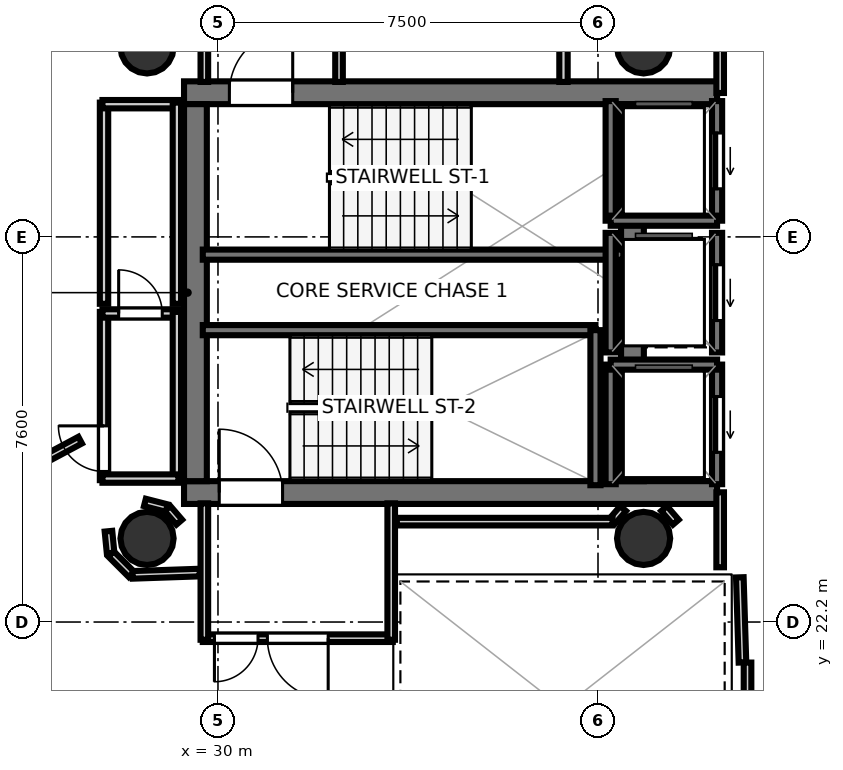
"""IFC4 building model, lengths in metres.
Left out: names, types, materials, properties, quantities, classifications, styles, units other than length and angle.
Written with IfcOpenShell. Run it as: python <this file> out.ifc"""

import sys

from ifc_helpers import new_model, si_unit, direction, frame, frame_2d, origin, origin_2d, place, context, subcontext, project, spatial, rectangle, hollow_circle, extrude, element, fill, save


model = new_model("IFC4")
c1 = context("Model", 3, precision=1e-05, world=origin(), true_north=direction((0.0, 1.0)))
c2 = subcontext(c1, "Body", "Model", "MODEL_VIEW")
j1 = project(units=[si_unit("LENGTHUNIT", "METRE"), si_unit("PLANEANGLEUNIT", "RADIAN")], contexts=[c1])
p1 = place(None, origin())
s1 = spatial("IfcSite", under=j1, at=p1, CompositionType="ELEMENT")
p2 = place(p1, origin())
s2 = spatial("IfcBuilding", under=s1, at=p2, CompositionType="ELEMENT")
p3 = place(p2, frame((0.0, 0.0, 239.0)))
s3 = spatial("IfcBuildingStorey", under=s2, at=p3, CompositionType="ELEMENT", Elevation=239.0)
p4 = place(p3, frame((29.33, 32.645, 0.0), z_axis=(0.0, 0.0, 1.0), x_axis=(1.0, 0.0, 0.0)))
e1 = element("IfcWall", 1, at=p4, inside=s3, PredefinedType="SHEAR", context=c2, shape_type="SweptSolid", body=[
    extrude(rectangle(XDim=10.52, YDim=0.45, at=frame_2d((5.26, 0.0))), origin(), (0.0, 0.0, 1.0), 3.52),
])
p5 = place(p4, frame((0.895, 0.0, 0.0)))
e2 = element("IfcOpeningElement", 2, at=p5, cuts=e1, PredefinedType="OPENING", context=c2, shape_type="SweptSolid", body=[
    extrude(rectangle(XDim=1.25, YDim=2.15, at=frame_2d((0.625, 1.075))), frame((0.0, 0.235, 0.0), z_axis=(0.0, -1.0, 0.0), x_axis=(1.0, 0.0, 0.0)), (0.0, 0.0, 1.0), 0.47),
])
p6 = place(p3, frame((29.33, 24.755, 0.0), z_axis=(0.0, 0.0, 1.0), x_axis=(1.0, 0.0, 0.0)))
e3 = element("IfcWall", 3, at=p6, inside=s3, PredefinedType="SHEAR", context=c2, shape_type="SweptSolid", body=[
    extrude(rectangle(XDim=10.52, YDim=0.45, at=frame_2d((5.26, 0.0))), origin(), (0.0, 0.0, 1.0), 3.52),
])
p7 = place(p6, frame((0.695, 0.0, 0.0)))
e4 = element("IfcOpeningElement", 4, at=p7, cuts=e3, PredefinedType="OPENING", context=c2, shape_type="SweptSolid", body=[
    extrude(rectangle(XDim=1.25, YDim=2.15, at=frame_2d((0.625, 1.075))), frame((0.0, 0.235, 0.0), z_axis=(0.0, -1.0, 0.0), x_axis=(1.0, 0.0, 0.0)), (0.0, 0.0, 1.0), 0.47),
])
for number, where, z_axis, x_axis in (
    (5, (29.555, 24.98, 0.0), (0.0, 0.0, 1.0), (0.0, 1.0, 0.0)),
    (6, (38.18, 24.98, 0.0), (0.0, 0.0, 1.0), (0.0, 1.0, 0.0)),
):
    element("IfcWall", number, at=place(p3, frame(where, z_axis=z_axis, x_axis=x_axis)), inside=s3, PredefinedType="SHEAR", context=c2, shape_type="SweptSolid", body=[
        extrude(rectangle(XDim=7.44, YDim=0.45, at=frame_2d((3.72, 0.0))), origin(), (0.0, 0.0, 1.0), 3.52),
    ])
for number, where, z_axis, x_axis in (
    (7, (28.6, 33.55, 0.0), (0.0, 0.0, 1.0), (1.0, 0.0, 0.0)),
    (8, (28.6, 23.85, 0.0), (0.0, 0.0, 1.0), (1.0, 0.0, 0.0)),
    (9, (38.4, 33.55, 0.0), (0.0, 0.0, 1.0), (1.0, 0.0, 0.0)),
    (10, (38.4, 23.85, 0.0), (0.0, 0.0, 1.0), (1.0, 0.0, 0.0)),
):
    element("IfcColumn", number, at=place(p3, frame(where, z_axis=z_axis, x_axis=x_axis)), inside=s3, PredefinedType="COLUMN", context=c2, shape_type="SweptSolid", body=[
        extrude(hollow_circle(Radius=0.525, WallThickness=0.028, at=origin_2d()), origin(), (0.0, 0.0, 1.0), 3.7),
    ])
p8 = place(p3, frame((29.7, 29.45, 0.0), z_axis=(0.0, 0.0, 1.0), x_axis=(1.0, 0.0, 0.0)))
e11 = element("IfcWall", 11, at=p8, inside=s3, PredefinedType="SOLIDWALL", context=c2, shape_type="SweptSolid", body=[
    extrude(rectangle(XDim=8.3, YDim=0.2, at=frame_2d((4.15, 0.0))), origin(), (0.0, 0.0, 1.0), 3.52),
])
p9 = place(p3, frame((29.7, 27.96, 0.0), z_axis=(0.0, 0.0, 1.0), x_axis=(1.0, 0.0, 0.0)))
e12 = element("IfcWall", 12, at=p9, inside=s3, PredefinedType="SOLIDWALL", context=c2, shape_type="SweptSolid", body=[
    extrude(rectangle(XDim=7.75, YDim=0.2, at=frame_2d((3.875, 0.0))), origin(), (0.0, 0.0, 1.0), 3.52),
])
p10 = place(p3, frame((37.45, 24.9, 0.0), z_axis=(0.0, 0.0, 1.0), x_axis=(0.0, 1.0, 0.0)))
e13 = element("IfcWall", 13, at=p10, inside=s3, PredefinedType="SOLIDWALL", context=c2, shape_type="SweptSolid", body=[
    extrude(rectangle(XDim=3.06, YDim=0.2, at=frame_2d((1.53, 0.0))), origin(), (0.0, 0.0, 1.0), 3.52),
])
p11 = place(p3, frame((39.85, 30.12, 0.0), z_axis=(0.0, 0.0, 1.0), x_axis=(0.0, 1.0, 0.0)))
e14 = element("IfcWall", 14, at=p11, inside=s3, PredefinedType="SOLIDWALL", context=c2, shape_type="SweptSolid", body=[
    extrude(rectangle(XDim=2.36, YDim=0.2, at=frame_2d((1.18, 0.0))), origin(), (0.0, 0.0, 1.0), 3.52),
])
p12 = place(p11, frame((0.63, 0.0, 0.0)))
e15 = element("IfcOpeningElement", 15, at=p12, cuts=e14, PredefinedType="OPENING", context=c2, shape_type="SweptSolid", body=[
    extrude(rectangle(XDim=1.1, YDim=2.15, at=frame_2d((0.55, 1.075))), frame((0.0, 0.11, 0.0), z_axis=(0.0, -1.0, 0.0), x_axis=(1.0, 0.0, 0.0)), (0.0, 0.0, 1.0), 0.22),
])
p13 = place(p3, frame((37.75, 30.12, 0.0), z_axis=(0.0, 0.0, 1.0), x_axis=(0.0, 1.0, 0.0)))
e16 = element("IfcWall", 16, at=p13, inside=s3, PredefinedType="SOLIDWALL", context=c2, shape_type="SweptSolid", body=[
    extrude(rectangle(XDim=2.36, YDim=0.2, at=frame_2d((1.18, 0.0))), origin(), (0.0, 0.0, 1.0), 3.52),
])
p14 = place(p3, frame((37.75, 30.12, 0.0), z_axis=(0.0, 0.0, 1.0), x_axis=(1.0, 0.0, 0.0)))
e17 = element("IfcWall", 17, at=p14, inside=s3, PredefinedType="SOLIDWALL", context=c2, shape_type="SweptSolid", body=[
    extrude(rectangle(XDim=2.1, YDim=0.2, at=frame_2d((1.05, 0.0))), origin(), (0.0, 0.0, 1.0), 3.52),
])
p15 = place(p3, frame((39.85, 24.92, 0.0), z_axis=(0.0, 0.0, 1.0), x_axis=(0.0, 1.0, 0.0)))
e18 = element("IfcWall", 18, at=p15, inside=s3, PredefinedType="SOLIDWALL", context=c2, shape_type="SweptSolid", body=[
    extrude(rectangle(XDim=2.36, YDim=0.2, at=frame_2d((1.18, 0.0))), origin(), (0.0, 0.0, 1.0), 3.52),
])
p16 = place(p15, frame((0.63, 0.0, 0.0)))
e19 = element("IfcOpeningElement", 19, at=p16, cuts=e18, PredefinedType="OPENING", context=c2, shape_type="SweptSolid", body=[
    extrude(rectangle(XDim=1.1, YDim=2.15, at=frame_2d((0.55, 1.075))), frame((0.0, 0.11, 0.0), z_axis=(0.0, -1.0, 0.0), x_axis=(1.0, 0.0, 0.0)), (0.0, 0.0, 1.0), 0.22),
])
p17 = place(p3, frame((37.75, 24.92, 0.0), z_axis=(0.0, 0.0, 1.0), x_axis=(0.0, 1.0, 0.0)))
e20 = element("IfcWall", 20, at=p17, inside=s3, PredefinedType="SOLIDWALL", context=c2, shape_type="SweptSolid", body=[
    extrude(rectangle(XDim=2.36, YDim=0.2, at=frame_2d((1.18, 0.0))), origin(), (0.0, 0.0, 1.0), 3.52),
])
p18 = place(p3, frame((37.75, 27.28, 0.0), z_axis=(0.0, 0.0, 1.0), x_axis=(1.0, 0.0, 0.0)))
e21 = element("IfcWall", 21, at=p18, inside=s3, PredefinedType="SOLIDWALL", context=c2, shape_type="SweptSolid", body=[
    extrude(rectangle(XDim=2.1, YDim=0.2, at=frame_2d((1.05, 0.0))), origin(), (0.0, 0.0, 1.0), 3.52),
])
p19 = place(p3, frame((39.85, 27.52, 0.0), z_axis=(0.0, 0.0, 1.0), x_axis=(0.0, 1.0, 0.0)))
e22 = element("IfcWall", 22, at=p19, inside=s3, PredefinedType="SOLIDWALL", context=c2, shape_type="SweptSolid", body=[
    extrude(rectangle(XDim=2.36, YDim=0.2, at=frame_2d((1.18, 0.0))), origin(), (0.0, 0.0, 1.0), 3.52),
])
p20 = place(p19, frame((0.63, 0.0, 0.0)))
e23 = element("IfcOpeningElement", 23, at=p20, cuts=e22, PredefinedType="OPENING", context=c2, shape_type="SweptSolid", body=[
    extrude(rectangle(XDim=1.1, YDim=2.15, at=frame_2d((0.55, 1.075))), frame((0.0, 0.11, 0.0), z_axis=(0.0, -1.0, 0.0), x_axis=(1.0, 0.0, 0.0)), (0.0, 0.0, 1.0), 0.22),
])
p21 = place(p3, frame((37.75, 27.52, 0.0), z_axis=(0.0, 0.0, 1.0), x_axis=(0.0, 1.0, 0.0)))
e24 = element("IfcWall", 24, at=p21, inside=s3, PredefinedType="SOLIDWALL", context=c2, shape_type="SweptSolid", body=[
    extrude(rectangle(XDim=2.36, YDim=0.2, at=frame_2d((1.18, 0.0))), origin(), (0.0, 0.0, 1.0), 3.52),
])
for number, where, z_axis, x_axis in (
    (25, (29.731, 32.858, 0.0), (0.0, 0.0, 1.0), (0.0, 1.0, 0.0)),
    (26, (32.389, 35.52, 0.0), (0.0, 0.0, 1.0), (0.0, -1.0, 0.0)),
):
    element("IfcWall", number, at=place(p3, frame(where, z_axis=z_axis, x_axis=x_axis)), inside=s3, PredefinedType="PARTITIONING", context=c2, shape_type="SweptSolid", body=[
        extrude(rectangle(XDim=2.662, YDim=0.15, at=frame_2d((1.331, 0.0))), origin(), (0.0, 0.0, 1.0), 2.84),
    ])
p22 = place(p3, frame((33.45, 21.881, 0.0), z_axis=(0.0, 0.0, 1.0), x_axis=(-1.0, 0.0, 0.0)))
e27 = element("IfcWall", 27, at=p22, inside=s3, PredefinedType="PARTITIONING", context=c2, shape_type="SweptSolid", body=[
    extrude(rectangle(XDim=3.75, YDim=0.15, at=frame_2d((1.875, 0.0))), origin(), (0.0, 0.0, 1.0), 2.84),
])
p23 = place(p22, frame((1.275, 0.0, 0.0)))
e28 = element("IfcOpeningElement", 28, at=p23, cuts=e27, PredefinedType="OPENING", context=c2, shape_type="SweptSolid", body=[
    extrude(rectangle(XDim=1.2, YDim=2.15, at=frame_2d((0.6, 1.075))), frame((0.0, 0.085, 0.0), z_axis=(0.0, -1.0, 0.0), x_axis=(1.0, 0.0, 0.0)), (0.0, 0.0, 1.0), 0.17),
])
p24 = place(p22, frame((2.66, 0.0, 0.0)))
e29 = element("IfcOpeningElement", 29, at=p24, cuts=e27, PredefinedType="OPENING", context=c2, shape_type="SweptSolid", body=[
    extrude(rectangle(XDim=0.86, YDim=2.05, at=frame_2d((0.43, 1.025))), frame((0.0, 0.085, 0.0), z_axis=(0.0, -1.0, 0.0), x_axis=(1.0, 0.0, 0.0)), (0.0, 0.0, 1.0), 0.17),
])
for number, where, z_axis, x_axis in (
    (30, (29.731, 21.85, 0.0), (0.0, 0.0, 1.0), (0.0, 1.0, 0.0)),
    (31, (33.419, 24.542, 0.0), (0.0, 0.0, 1.0), (0.0, -1.0, 0.0)),
):
    element("IfcWall", number, at=place(p3, frame(where, z_axis=z_axis, x_axis=x_axis)), inside=s3, PredefinedType="PARTITIONING", context=c2, shape_type="SweptSolid", body=[
        extrude(rectangle(XDim=2.692, YDim=0.15, at=frame_2d((1.346, 0.0))), origin(), (0.0, 0.0, 1.0), 2.84),
    ])
p25 = place(p3, frame((40.351, 21.401, 0.0), z_axis=(0.0, 0.0, 1.0), x_axis=(-0.031058045979, 0.999517582527, 0.0)))
e32 = element("IfcWall", 32, at=p25, inside=s3, PredefinedType="PARTITIONING", context=c2, shape_type="SweptSolid", body=[
    extrude(rectangle(XDim=1.682, YDim=0.15, at=frame_2d((0.841, 0.0))), origin(), (0.0, 0.0, 1.0), 2.84),
])
p26 = place(p3, frame((39.911, 23.28, 0.0), z_axis=(0.0, 0.0, 1.0), x_axis=(0.0, 1.0, 0.0)))
e33 = element("IfcWall", 33, at=p26, inside=s3, PredefinedType="PARTITIONING", context=c2, shape_type="SweptSolid", body=[
    extrude(rectangle(XDim=1.48, YDim=0.15, at=frame_2d((0.74, 0.0))), origin(), (0.0, 0.0, 1.0), 2.84),
])
p27 = place(p3, frame((39.911, 32.64, 0.0), z_axis=(0.0, 0.0, 1.0), x_axis=(0.0, 1.0, 0.0)))
e34 = element("IfcWall", 34, at=p27, inside=s3, PredefinedType="PARTITIONING", context=c2, shape_type="SweptSolid", body=[
    extrude(rectangle(XDim=2.88, YDim=0.15, at=frame_2d((1.44, 0.0))), origin(), (0.0, 0.0, 1.0), 2.84),
])
p28 = place(p3, frame((40.451, 18.08, 0.0), z_axis=(0.0, 0.0, 1.0), x_axis=(0.0, 1.0, 0.0)))
e35 = element("IfcWall", 35, at=p28, inside=s3, PredefinedType="PARTITIONING", context=c2, shape_type="SweptSolid", body=[
    extrude(rectangle(XDim=3.32, YDim=0.15, at=frame_2d((1.66, 0.0))), origin(), (0.0, 0.0, 1.0), 2.84),
])
p29 = place(p3, frame((36.819, 35.48, 0.0), z_axis=(0.0, 0.0, 1.0), x_axis=(0.0, -1.0, 0.0)))
e36 = element("IfcWall", 36, at=p29, inside=s3, PredefinedType="PLUMBINGWALL", context=c2, shape_type="SweptSolid", body=[
    extrude(rectangle(XDim=2.622, YDim=0.165, at=frame_2d((1.311, 0.0))), origin(), (0.0, 0.0, 1.0), 2.84),
])
p30 = place(p3, frame((27.751, 25.0, 0.0), z_axis=(0.0, 0.0, 1.0), x_axis=(0.0, 1.0, 0.0)))
e37 = element("IfcWall", 37, at=p30, inside=s3, PredefinedType="PLUMBINGWALL", context=c2, shape_type="SweptSolid", body=[
    extrude(rectangle(XDim=3.32, YDim=0.165, at=frame_2d((1.66, 0.0))), origin(), (0.0, 0.0, 1.0), 2.84),
])
p31 = place(p30, frame((0.171, 0.0, 0.0)))
e38 = element("IfcOpeningElement", 38, at=p31, cuts=e37, PredefinedType="OPENING", context=c2, shape_type="SweptSolid", body=[
    extrude(rectangle(XDim=0.9, YDim=2.1, at=frame_2d((0.45, 1.05))), frame((0.0, 0.093, 0.0), z_axis=(0.0, -1.0, 0.0), x_axis=(1.0, 0.0, 0.0)), (0.0, 0.0, 1.0), 0.185),
])
p32 = place(p3, frame((27.72, 28.289, 0.0), z_axis=(0.0, 0.0, 1.0), x_axis=(1.0, 0.0, 0.0)))
e39 = element("IfcWall", 39, at=p32, inside=s3, PredefinedType="PLUMBINGWALL", context=c2, shape_type="SweptSolid", body=[
    extrude(rectangle(XDim=1.5, YDim=0.165, at=frame_2d((0.75, 0.0))), origin(), (0.0, 0.0, 1.0), 2.84),
])
p33 = place(p32, frame((0.32, 0.0, 0.0)))
e40 = element("IfcOpeningElement", 40, at=p33, cuts=e39, PredefinedType="OPENING", context=c2, shape_type="SweptSolid", body=[
    extrude(rectangle(XDim=0.86, YDim=2.05, at=frame_2d((0.43, 1.025))), frame((0.0, 0.093, 0.0), z_axis=(0.0, -1.0, 0.0), x_axis=(1.0, 0.0, 0.0)), (0.0, 0.0, 1.0), 0.185),
])
p34 = place(p3, frame((29.189, 28.32, 0.0), z_axis=(0.0, 0.0, 1.0), x_axis=(0.0, -1.0, 0.0)))
e41 = element("IfcWall", 41, at=p34, inside=s3, PredefinedType="PLUMBINGWALL", context=c2, shape_type="SweptSolid", body=[
    extrude(rectangle(XDim=3.32, YDim=0.165, at=frame_2d((1.66, 0.0))), origin(), (0.0, 0.0, 1.0), 2.84),
])
p35 = place(p3, frame((29.22, 25.031, 0.0), z_axis=(0.0, 0.0, 1.0), x_axis=(-1.0, 0.0, 0.0)))
e42 = element("IfcWall", 42, at=p35, inside=s3, PredefinedType="PLUMBINGWALL", context=c2, shape_type="SweptSolid", body=[
    extrude(rectangle(XDim=1.5, YDim=0.165, at=frame_2d((0.75, 0.0))), origin(), (0.0, 0.0, 1.0), 2.84),
])
p36 = place(p3, frame((27.751, 28.48, 0.0), z_axis=(0.0, 0.0, 1.0), x_axis=(0.0, 1.0, 0.0)))
e43 = element("IfcWall", 43, at=p36, inside=s3, PredefinedType="PLUMBINGWALL", context=c2, shape_type="SweptSolid", body=[
    extrude(rectangle(XDim=3.97, YDim=0.165, at=frame_2d((1.985, 0.0))), origin(), (0.0, 0.0, 1.0), 2.84),
])
p37 = place(p3, frame((27.72, 32.419, 0.0), z_axis=(0.0, 0.0, 1.0), x_axis=(1.0, 0.0, 0.0)))
e44 = element("IfcWall", 44, at=p37, inside=s3, PredefinedType="PLUMBINGWALL", context=c2, shape_type="SweptSolid", body=[
    extrude(rectangle(XDim=1.5, YDim=0.165, at=frame_2d((0.75, 0.0))), origin(), (0.0, 0.0, 1.0), 2.84),
])
p38 = place(p3, frame((29.189, 32.45, 0.0), z_axis=(0.0, 0.0, 1.0), x_axis=(0.0, -1.0, 0.0)))
e45 = element("IfcWall", 45, at=p38, inside=s3, PredefinedType="PLUMBINGWALL", context=c2, shape_type="SweptSolid", body=[
    extrude(rectangle(XDim=3.97, YDim=0.165, at=frame_2d((1.985, 0.0))), origin(), (0.0, 0.0, 1.0), 2.84),
])
p39 = place(p3, frame((29.236, 24.17, 0.0), z_axis=(0.0, 0.0, 1.0), x_axis=(-0.652260263346, 0.757995084984, 0.0)))
e46 = element("IfcWall", 46, at=p39, inside=s3, PredefinedType="PARTITIONING", context=c2, shape_type="SweptSolid", body=[
    extrude(rectangle(XDim=0.355, YDim=0.15, at=frame_2d((0.178, 0.0))), origin(), (0.0, 0.0, 1.0), 2.84),
])
p40 = place(p3, frame((28.988, 24.45, 0.0), z_axis=(0.0, 0.0, 1.0), x_axis=(-0.968704505916, 0.248216800836, 0.0)))
e47 = element("IfcWall", 47, at=p40, inside=s3, PredefinedType="PARTITIONING", context=c2, shape_type="SweptSolid", body=[
    extrude(rectangle(XDim=0.445, YDim=0.15, at=frame_2d((0.222, 0.0))), origin(), (0.0, 0.0, 1.0), 2.84),
])
p41 = place(p3, frame((39.036, 24.17, 0.0), z_axis=(0.0, 0.0, 1.0), x_axis=(-0.652260263346, 0.757995084984, 0.0)))
e48 = element("IfcWall", 48, at=p41, inside=s3, PredefinedType="PARTITIONING", context=c2, shape_type="SweptSolid", body=[
    extrude(rectangle(XDim=0.355, YDim=0.15, at=frame_2d((0.178, 0.0))), origin(), (0.0, 0.0, 1.0), 2.84),
])
p42 = place(p3, frame((37.996, 24.44, 0.0), z_axis=(0.0, 0.0, 1.0), x_axis=(-0.652425645794, -0.757852740782, 0.0)))
e49 = element("IfcWall", 49, at=p42, inside=s3, PredefinedType="PARTITIONING", context=c2, shape_type="SweptSolid", body=[
    extrude(rectangle(XDim=0.32, YDim=0.15, at=frame_2d((0.16, 0.0))), origin(), (0.0, 0.0, 1.0), 2.84),
])
p43 = place(p3, frame((37.787, 24.181, 0.0), z_axis=(0.0, 0.0, 1.0), x_axis=(-1.0, 0.0, 0.0)))
e50 = element("IfcWall", 50, at=p43, inside=s3, PredefinedType="PARTITIONING", context=c2, shape_type="SweptSolid", body=[
    extrude(rectangle(XDim=4.257, YDim=0.15, at=frame_2d((2.129, 0.0))), origin(), (0.0, 0.0, 1.0), 2.84),
])
p44 = place(p3, frame((27.838, 23.992, 0.0), z_axis=(0.0, 0.0, 1.0), x_axis=(0.098273407977, -0.995159453196, 0.0)))
e51 = element("IfcWall", 51, at=p44, inside=s3, PredefinedType="PARTITIONING", context=c2, shape_type="SweptSolid", body=[
    extrude(rectangle(XDim=0.432, YDim=0.15, at=frame_2d((0.216, 0.0))), origin(), (0.0, 0.0, 1.0), 2.84),
])
p45 = place(p3, frame((27.89, 23.543, 0.0), z_axis=(0.0, 0.0, 1.0), x_axis=(0.707106781187, -0.707106781187, 0.0)))
e52 = element("IfcWall", 52, at=p45, inside=s3, PredefinedType="PARTITIONING", context=c2, shape_type="SweptSolid", body=[
    extrude(rectangle(XDim=0.57, YDim=0.15, at=frame_2d((0.285, 0.0))), origin(), (0.0, 0.0, 1.0), 2.84),
])
p46 = place(p3, frame((28.316, 23.131, 0.0), z_axis=(0.0, 0.0, 1.0), x_axis=(0.999405342193, 0.034481328227, 0.0)))
e53 = element("IfcWall", 53, at=p46, inside=s3, PredefinedType="PARTITIONING", context=c2, shape_type="SweptSolid", body=[
    extrude(rectangle(XDim=1.324, YDim=0.15, at=frame_2d((0.662, 0.0))), origin(), (0.0, 0.0, 1.0), 2.84),
])
p47 = place(p3, frame((26.746, 20.449, 0.0), z_axis=(0.0, 0.0, 1.0), x_axis=(-0.382881317414, 0.923797541009, 0.0)))
e54 = element("IfcWall", 54, at=p47, inside=s3, PredefinedType="PARTITIONING", context=c2, shape_type="SweptSolid", body=[
    extrude(rectangle(XDim=0.57, YDim=0.15, at=frame_2d((0.285, 0.0))), origin(), (0.0, 0.0, 1.0), 2.84),
])
p48 = place(p3, frame((25.965, 25.086, 0.0), z_axis=(0.0, 0.0, 1.0), x_axis=(0.881881208279, 0.471471668803, 0.0)))
e55 = element("IfcWall", 55, at=p48, inside=s3, PredefinedType="PARTITIONING", context=c2, shape_type="SweptSolid", body=[
    extrude(rectangle(XDim=1.491, YDim=0.15, at=frame_2d((0.746, 0.0))), origin(), (0.0, 0.0, 1.0), 2.84),
])
p49 = place(p5, origin())
e56 = element("IfcDoor", 56, at=p49, inside=s3, OperationType="SINGLE_SWING_RIGHT", PredefinedType="DOOR", context=c2, shape_type="SweptSolid", body=[
    extrude(rectangle(XDim=1.25, YDim=2.15, at=frame_2d((0.625, 1.075))), frame((0.0, 0.025, 0.0), z_axis=(0.0, -1.0, 0.0), x_axis=(1.0, 0.0, 0.0)), (0.0, 0.0, 1.0), 0.05),
])
fill(e2, e56)
p50 = place(p7, origin())
e57 = element("IfcDoor", 57, at=p50, inside=s3, OperationType="SINGLE_SWING_LEFT", PredefinedType="DOOR", context=c2, shape_type="SweptSolid", body=[
    extrude(rectangle(XDim=1.25, YDim=2.15, at=frame_2d((0.625, 1.075))), frame((0.0, 0.025, 0.0), z_axis=(0.0, -1.0, 0.0), x_axis=(1.0, 0.0, 0.0)), (0.0, 0.0, 1.0), 0.05),
])
fill(e4, e57)
p51 = place(p12, origin())
e58 = element("IfcDoor", 58, at=p51, inside=s3, OperationType="SLIDING_TO_LEFT", PredefinedType="DOOR", context=c2, shape_type="SweptSolid", body=[
    extrude(rectangle(XDim=1.1, YDim=2.15, at=frame_2d((0.55, 1.075))), frame((0.0, 0.025, 0.0), z_axis=(0.0, -1.0, 0.0), x_axis=(1.0, 0.0, 0.0)), (0.0, 0.0, 1.0), 0.05),
])
fill(e15, e58)
p52 = place(p16, origin())
e59 = element("IfcDoor", 59, at=p52, inside=s3, OperationType="SLIDING_TO_LEFT", PredefinedType="DOOR", context=c2, shape_type="SweptSolid", body=[
    extrude(rectangle(XDim=1.1, YDim=2.15, at=frame_2d((0.55, 1.075))), frame((0.0, 0.025, 0.0), z_axis=(0.0, -1.0, 0.0), x_axis=(1.0, 0.0, 0.0)), (0.0, 0.0, 1.0), 0.05),
])
fill(e19, e59)
p53 = place(p20, origin())
e60 = element("IfcDoor", 60, at=p53, inside=s3, OperationType="SLIDING_TO_LEFT", PredefinedType="DOOR", context=c2, shape_type="SweptSolid", body=[
    extrude(rectangle(XDim=1.1, YDim=2.15, at=frame_2d((0.55, 1.075))), frame((0.0, 0.025, 0.0), z_axis=(0.0, -1.0, 0.0), x_axis=(1.0, 0.0, 0.0)), (0.0, 0.0, 1.0), 0.05),
])
fill(e23, e60)
p54 = place(p23, origin())
e61 = element("IfcDoor", 61, at=p54, inside=s3, OperationType="SINGLE_SWING_LEFT", PredefinedType="DOOR", context=c2, shape_type="SweptSolid", body=[
    extrude(rectangle(XDim=1.2, YDim=2.15, at=frame_2d((0.6, 1.075))), frame((0.0, 0.025, 0.0), z_axis=(0.0, -1.0, 0.0), x_axis=(1.0, 0.0, 0.0)), (0.0, 0.0, 1.0), 0.05),
])
fill(e28, e61)
p55 = place(p31, origin())
e62 = element("IfcDoor", 62, at=p55, inside=s3, OperationType="SINGLE_SWING_RIGHT", PredefinedType="DOOR", context=c2, shape_type="SweptSolid", body=[
    extrude(rectangle(XDim=0.9, YDim=2.1, at=frame_2d((0.45, 1.05))), frame((0.0, 0.025, 0.0), z_axis=(0.0, -1.0, 0.0), x_axis=(1.0, 0.0, 0.0)), (0.0, 0.0, 1.0), 0.05),
])
fill(e38, e62)
p56 = place(p33, origin())
e63 = element("IfcDoor", 63, at=p56, inside=s3, OperationType="SINGLE_SWING_LEFT", PredefinedType="DOOR", context=c2, shape_type="SweptSolid", body=[
    extrude(rectangle(XDim=0.86, YDim=2.05, at=frame_2d((0.43, 1.025))), frame((0.0, 0.025, 0.0), z_axis=(0.0, -1.0, 0.0), x_axis=(1.0, 0.0, 0.0)), (0.0, 0.0, 1.0), 0.05),
])
fill(e40, e63)
p57 = place(p24, origin())
e64 = element("IfcDoor", 64, at=p57, inside=s3, OperationType="SINGLE_SWING_RIGHT", PredefinedType="DOOR", context=c2, shape_type="SweptSolid", body=[
    extrude(rectangle(XDim=0.86, YDim=2.05, at=frame_2d((0.43, 1.025))), frame((0.0, 0.025, 0.0), z_axis=(0.0, -1.0, 0.0), x_axis=(1.0, 0.0, 0.0)), (0.0, 0.0, 1.0), 0.05),
])
fill(e29, e64)
save(model, sys.argv[1])
